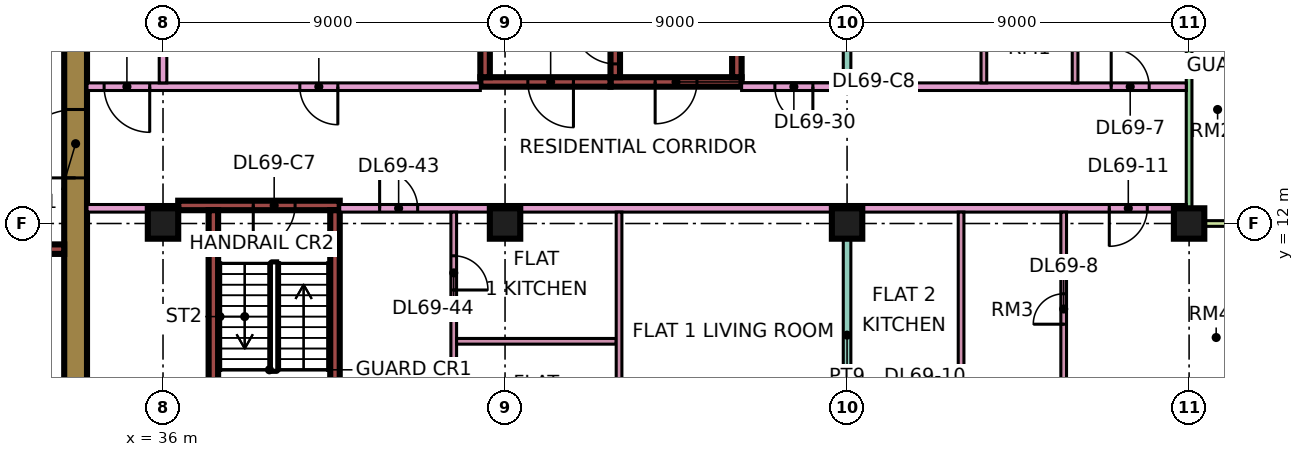
"""IFC4 building model, lengths in metres.
Left out: names, types, materials, properties, quantities, classifications, styles, units other than length and angle.
Written with IfcOpenShell. Run it as: python <this file> out.ifc"""

import sys

from ifc_helpers import new_model, si_unit, direction, frame, frame_2d, origin, origin_2d, place, context, subcontext, project, spatial, rectangle, extrude, element, fill, save


model = new_model("IFC4")
c1 = context("Model", 3, precision=1e-05, world=origin(), true_north=direction((0.0, 1.0)))
c2 = subcontext(c1, "Body", "Model", "MODEL_VIEW")
j1 = project(units=[si_unit("LENGTHUNIT", "METRE"), si_unit("PLANEANGLEUNIT", "RADIAN")], contexts=[c1])
p1 = place(None, origin())
s1 = spatial("IfcSite", under=j1, at=p1, CompositionType="ELEMENT")
p2 = place(p1, origin())
s2 = spatial("IfcBuilding", under=s1, at=p2, CompositionType="ELEMENT")
p3 = place(p2, frame((0.0, 0.0, 295.9)))
s3 = spatial("IfcBuildingStorey", under=s2, at=p3, CompositionType="ELEMENT", Elevation=295.9)
for number, where, z_axis, x_axis in (
    (1, (36.0, 12.0, 0.0), (0.0, 0.0, 1.0), (1.0, 0.0, 0.0)),
    (2, (45.0, 12.0, 0.0), (0.0, 0.0, 1.0), (1.0, 0.0, 0.0)),
    (3, (54.0, 12.0, 0.0), (0.0, 0.0, 1.0), (1.0, 0.0, 0.0)),
    (4, (63.0, 12.0, 0.0), (0.0, 0.0, 1.0), (1.0, 0.0, 0.0)),
):
    element("IfcColumn", number, at=place(p3, frame(where, z_axis=z_axis, x_axis=x_axis)), inside=s3, PredefinedType="COLUMN", context=c2, shape_type="SweptSolid", body=[
        extrude(rectangle(XDim=0.8, YDim=0.8, at=origin_2d()), origin(), (0.0, 0.0, 1.0), 3.75),
    ])
p4 = place(p3, frame((33.7, 7.6, 0.0), z_axis=(0.0, 0.0, 1.0), x_axis=(0.0, 1.0, 0.0)))
e5 = element("IfcWall", 5, at=p4, inside=s3, PredefinedType="SHEAR", context=c2, shape_type="SweptSolid", body=[
    extrude(rectangle(XDim=11.8, YDim=0.6, at=frame_2d((5.9, 0.0))), origin(), (0.0, 0.0, 1.0), 3.75),
])
p5 = place(p4, frame((5.6, 0.0, 0.0)))
e6 = element("IfcOpeningElement", 6, at=p5, cuts=e5, PredefinedType="OPENING", context=c2, shape_type="SweptSolid", body=[
    extrude(rectangle(XDim=1.8, YDim=2.4, at=frame_2d((0.9, 1.2))), frame((0.0, 0.31, 0.0), z_axis=(0.0, -1.0, 0.0), x_axis=(1.0, 0.0, 0.0)), (0.0, 0.0, 1.0), 0.62),
])
p6 = place(p3, frame((13.45, 11.325, 0.0), z_axis=(0.0, 0.0, 1.0), x_axis=(1.0, 0.0, 0.0)))
e7 = element("IfcWall", 7, at=p6, inside=s3, PredefinedType="SHEAR", context=c2, shape_type="SweptSolid", body=[
    extrude(rectangle(XDim=19.95, YDim=0.25, at=frame_2d((9.975, 0.0))), origin(), (0.0, 0.0, 1.0), 3.75),
])
p7 = place(p6, frame((4.925, 0.0, 0.0)))
e8 = element("IfcOpeningElement", 8, at=p7, cuts=e7, PredefinedType="OPENING", context=c2, shape_type="SweptSolid", body=[
    extrude(rectangle(XDim=0.9, YDim=2.1, at=frame_2d((0.45, 1.05))), frame((0.0, 0.135, 0.0), z_axis=(0.0, -1.0, 0.0), x_axis=(1.0, 0.0, 0.0)), (0.0, 0.0, 1.0), 0.27),
])
p8 = place(p6, frame((12.3, 0.0, 0.0)))
e9 = element("IfcOpeningElement", 9, at=p8, cuts=e7, PredefinedType="OPENING", context=c2, shape_type="SweptSolid", body=[
    extrude(rectangle(XDim=0.9, YDim=2.1, at=frame_2d((0.45, 1.05))), frame((0.0, 0.135, 0.0), z_axis=(0.0, -1.0, 0.0), x_axis=(1.0, 0.0, 0.0)), (0.0, 0.0, 1.0), 0.27),
])
p9 = place(p6, frame((16.775, 0.0, 0.0)))
e10 = element("IfcOpeningElement", 10, at=p9, cuts=e7, PredefinedType="OPENING", context=c2, shape_type="SweptSolid", body=[
    extrude(rectangle(XDim=0.9, YDim=2.1, at=frame_2d((0.45, 1.05))), frame((0.0, 0.135, 0.0), z_axis=(0.0, -1.0, 0.0), x_axis=(1.0, 0.0, 0.0)), (0.0, 0.0, 1.0), 0.27),
])
p10 = place(p3, frame((36.4, 12.475, 0.0), z_axis=(0.0, 0.0, 1.0), x_axis=(1.0, 0.0, 0.0)))
e11 = element("IfcWall", 11, at=p10, inside=s3, PredefinedType="SHEAR", context=c2, shape_type="SweptSolid", body=[
    extrude(rectangle(XDim=4.25, YDim=0.25, at=frame_2d((2.125, 0.0))), origin(), (0.0, 0.0, 1.0), 3.75),
])
p11 = place(p10, frame((1.975, 0.0, 0.0)))
e12 = element("IfcOpeningElement", 12, at=p11, cuts=e11, PredefinedType="OPENING", context=c2, shape_type="SweptSolid", body=[
    extrude(rectangle(XDim=1.1, YDim=2.2, at=frame_2d((0.55, 1.1))), frame((0.0, 0.135, 0.0), z_axis=(0.0, -1.0, 0.0), x_axis=(1.0, 0.0, 0.0)), (0.0, 0.0, 1.0), 0.27),
])
for number, where, z_axis, x_axis in (
    (13, (37.325, 5.85, 0.0), (0.0, 0.0, 1.0), (0.0, 1.0, 0.0)),
    (14, (40.525, 5.85, 0.0), (0.0, 0.0, 1.0), (0.0, 1.0, 0.0)),
):
    element("IfcWall", number, at=place(p3, frame(where, z_axis=z_axis, x_axis=x_axis)), inside=s3, PredefinedType="SHEAR", context=c2, shape_type="SweptSolid", body=[
        extrude(rectangle(XDim=6.5, YDim=0.25, at=frame_2d((3.25, 0.0))), origin(), (0.0, 0.0, 1.0), 3.75),
    ])
p12 = place(p3, frame((47.775, 15.725, 0.0), z_axis=(0.0, 0.0, 1.0), x_axis=(1.0, 0.0, 0.0)))
e15 = element("IfcWall", 15, at=p12, inside=s3, PredefinedType="SHEAR", context=c2, shape_type="SweptSolid", body=[
    extrude(rectangle(XDim=3.45, YDim=0.25, at=frame_2d((1.725, 0.0))), origin(), (0.0, 0.0, 1.0), 3.75),
])
p13 = place(p12, frame((1.175, 0.0, 0.0)))
e16 = element("IfcOpeningElement", 16, at=p13, cuts=e15, PredefinedType="OPENING", context=c2, shape_type="SweptSolid", body=[
    extrude(rectangle(XDim=1.1, YDim=2.2, at=frame_2d((0.55, 1.1))), frame((0.0, 0.135, 0.0), z_axis=(0.0, -1.0, 0.0), x_axis=(1.0, 0.0, 0.0)), (0.0, 0.0, 1.0), 0.27),
])
p14 = place(p3, frame((47.9, 15.85, 0.0), z_axis=(0.0, 0.0, 1.0), x_axis=(0.0, 1.0, 0.0)))
e17 = element("IfcWall", 17, at=p14, inside=s3, PredefinedType="SHEAR", context=c2, shape_type="SweptSolid", body=[
    extrude(rectangle(XDim=6.5, YDim=0.25, at=frame_2d((3.25, 0.0))), origin(), (0.0, 0.0, 1.0), 3.75),
])
p15 = place(p14, frame((0.35, 0.0, 0.0)))
e18 = element("IfcOpeningElement", 18, at=p15, cuts=e17, PredefinedType="OPENING", context=c2, shape_type="SweptSolid", body=[
    extrude(rectangle(XDim=1.1, YDim=2.2, at=frame_2d((0.55, 1.1))), frame((0.0, 0.135, 0.0), z_axis=(0.0, -1.0, 0.0), x_axis=(1.0, 0.0, 0.0)), (0.0, 0.0, 1.0), 0.27),
])
p16 = place(p3, frame((51.1, 15.85, 0.0), z_axis=(0.0, 0.0, 1.0), x_axis=(0.0, 1.0, 0.0)))
e19 = element("IfcWall", 19, at=p16, inside=s3, PredefinedType="SHEAR", context=c2, shape_type="SweptSolid", body=[
    extrude(rectangle(XDim=6.5, YDim=0.25, at=frame_2d((3.25, 0.0))), origin(), (0.0, 0.0, 1.0), 3.75),
])
p17 = place(p3, frame((44.35, 15.725, 0.0), z_axis=(0.0, 0.0, 1.0), x_axis=(1.0, 0.0, 0.0)))
e20 = element("IfcWall", 20, at=p17, inside=s3, PredefinedType="SHEAR", context=c2, shape_type="SweptSolid", body=[
    extrude(rectangle(XDim=3.425, YDim=0.25, at=frame_2d((1.712, 0.0))), origin(), (0.0, 0.0, 1.0), 3.75),
])
p18 = place(p17, frame((1.25, 0.0, 0.0)))
e21 = element("IfcOpeningElement", 21, at=p18, cuts=e20, PredefinedType="OPENING", context=c2, shape_type="SweptSolid", body=[
    extrude(rectangle(XDim=1.2, YDim=2.2, at=frame_2d((0.6, 1.1))), frame((0.0, 0.135, 0.0), z_axis=(0.0, -1.0, 0.0), x_axis=(1.0, 0.0, 0.0)), (0.0, 0.0, 1.0), 0.27),
])
p19 = place(p3, frame((44.475, 15.85, 0.0), z_axis=(0.0, 0.0, 1.0), x_axis=(0.0, 1.0, 0.0)))
e22 = element("IfcWall", 22, at=p19, inside=s3, PredefinedType="SHEAR", context=c2, shape_type="SweptSolid", body=[
    extrude(rectangle(XDim=6.5, YDim=0.25, at=frame_2d((3.25, 0.0))), origin(), (0.0, 0.0, 1.0), 3.75),
])
p20 = place(p19, frame((1.75, 0.0, 0.0)))
e23 = element("IfcOpeningElement", 23, at=p20, cuts=e22, PredefinedType="OPENING", context=c2, shape_type="SweptSolid", body=[
    extrude(rectangle(XDim=1.1, YDim=2.2, at=frame_2d((0.55, 1.1))), frame((0.0, 0.135, 0.0), z_axis=(0.0, -1.0, 0.0), x_axis=(1.0, 0.0, 0.0)), (0.0, 0.0, 1.0), 0.27),
])
p21 = place(p19, frame((4.3, 0.0, 0.0)))
e24 = element("IfcOpeningElement", 24, at=p21, cuts=e22, PredefinedType="OPENING", context=c2, shape_type="SweptSolid", body=[
    extrude(rectangle(XDim=1.1, YDim=2.2, at=frame_2d((0.55, 1.1))), frame((0.0, 0.135, 0.0), z_axis=(0.0, -1.0, 0.0), x_axis=(1.0, 0.0, 0.0)), (0.0, 0.0, 1.0), 0.27),
])
p22 = place(p3, frame((63.0, 12.075, 0.0), z_axis=(0.0, 0.0, 1.0), x_axis=(0.0, 1.0, 0.0)))
e25 = element("IfcWall", 25, at=p22, inside=s3, PredefinedType="SOLIDWALL", context=c2, shape_type="SweptSolid", body=[
    extrude(rectangle(XDim=10.35, YDim=0.15, at=frame_2d((5.175, 0.0))), origin(), (0.0, 0.0, 1.0), 3.35),
])
p23 = place(p22, frame((6.038, 0.0, 0.0)))
e26 = element("IfcOpeningElement", 26, at=p23, cuts=e25, PredefinedType="OPENING", context=c2, shape_type="SweptSolid", body=[
    extrude(rectangle(XDim=1.8, YDim=2.4, at=frame_2d((0.9, 1.2))), frame((0.0, 0.085, 0.0), z_axis=(0.0, -1.0, 0.0), x_axis=(1.0, 0.0, 0.0)), (0.0, 0.0, 1.0), 0.17),
])
p24 = place(p3, frame((64.5, 12.0, 0.0), z_axis=(0.0, 0.0, 1.0), x_axis=(-1.0, 0.0, 0.0)))
e27 = element("IfcWall", 27, at=p24, inside=s3, PredefinedType="SOLIDWALL", context=c2, shape_type="SweptSolid", body=[
    extrude(rectangle(XDim=1.5, YDim=0.15, at=frame_2d((0.75, 0.0))), origin(), (0.0, 0.0, 1.0), 3.35),
])
p25 = place(p3, frame((34.0, 12.4, 0.0), z_axis=(0.0, 0.0, 1.0), x_axis=(1.0, 0.0, 0.0)))
e28 = element("IfcWall", 28, at=p25, inside=s3, PredefinedType="PARTITIONING", context=c2, shape_type="SweptSolid", body=[
    extrude(rectangle(XDim=2.401, YDim=0.2, at=frame_2d((1.2, 0.0))), origin(), (0.0, 0.0, 1.0), 3.35),
])
p26 = place(p3, frame((34.0, 15.6, 0.0), z_axis=(0.0, 0.0, 1.0), x_axis=(1.0, 0.0, 0.0)))
e29 = element("IfcWall", 29, at=p26, inside=s3, PredefinedType="PARTITIONING", context=c2, shape_type="SweptSolid", body=[
    extrude(rectangle(XDim=10.35, YDim=0.2, at=frame_2d((5.175, 0.0))), origin(), (0.0, 0.0, 1.0), 3.35),
])
p27 = place(p26, frame((5.6, 0.0, 0.0)))
e30 = element("IfcOpeningElement", 30, at=p27, cuts=e29, PredefinedType="OPENING", context=c2, shape_type="SweptSolid", body=[
    extrude(rectangle(XDim=1.0, YDim=2.1, at=frame_2d((0.5, 1.05))), frame((0.0, 0.11, 0.0), z_axis=(0.0, -1.0, 0.0), x_axis=(1.0, 0.0, 0.0)), (0.0, 0.0, 1.0), 0.22),
])
p28 = place(p26, frame((0.45, 0.0, 0.0)))
e31 = element("IfcOpeningElement", 31, at=p28, cuts=e29, PredefinedType="OPENING", context=c2, shape_type="SweptSolid", body=[
    extrude(rectangle(XDim=1.2, YDim=2.1, at=frame_2d((0.6, 1.05))), frame((0.0, 0.11, 0.0), z_axis=(0.0, -1.0, 0.0), x_axis=(1.0, 0.0, 0.0)), (0.0, 0.0, 1.0), 0.22),
])
p29 = place(p3, frame((36.0, 15.7, 0.0), z_axis=(0.0, 0.0, 1.0), x_axis=(0.0, 1.0, 0.0)))
e32 = element("IfcWall", 32, at=p29, inside=s3, PredefinedType="PARTITIONING", context=c2, shape_type="SweptSolid", body=[
    extrude(rectangle(XDim=8.3, YDim=0.2, at=frame_2d((4.15, 0.0))), origin(), (0.0, 0.0, 1.0), 3.35),
])
p30 = place(p3, frame((40.65, 12.4, 0.0), z_axis=(0.0, 0.0, 1.0), x_axis=(1.0, 0.0, 0.0)))
e33 = element("IfcWall", 33, at=p30, inside=s3, PredefinedType="PARTITIONING", context=c2, shape_type="SweptSolid", body=[
    extrude(rectangle(XDim=22.276, YDim=0.2, at=frame_2d((11.138, 0.0))), origin(), (0.0, 0.0, 1.0), 3.35),
])
p31 = place(p30, frame((20.25, 0.0, 0.0)))
e34 = element("IfcOpeningElement", 34, at=p31, cuts=e33, PredefinedType="OPENING", context=c2, shape_type="SweptSolid", body=[
    extrude(rectangle(XDim=1.0, YDim=2.1, at=frame_2d((0.5, 1.05))), frame((0.0, 0.11, 0.0), z_axis=(0.0, -1.0, 0.0), x_axis=(1.0, 0.0, 0.0)), (0.0, 0.0, 1.0), 0.22),
])
p32 = place(p30, frame((1.05, 0.0, 0.0)))
e35 = element("IfcOpeningElement", 35, at=p32, cuts=e33, PredefinedType="OPENING", context=c2, shape_type="SweptSolid", body=[
    extrude(rectangle(XDim=1.0, YDim=2.1, at=frame_2d((0.5, 1.05))), frame((0.0, 0.11, 0.0), z_axis=(0.0, -1.0, 0.0), x_axis=(1.0, 0.0, 0.0)), (0.0, 0.0, 1.0), 0.22),
])
p33 = place(p3, frame((43.65, 5.975, 0.0), z_axis=(0.0, 0.0, 1.0), x_axis=(0.0, 1.0, 0.0)))
e36 = element("IfcWall", 36, at=p33, inside=s3, PredefinedType="PARTITIONING", context=c2, shape_type="SweptSolid", body=[
    extrude(rectangle(XDim=6.325, YDim=0.15, at=frame_2d((3.163, 0.0))), origin(), (0.0, 0.0, 1.0), 3.35),
])
p34 = place(p33, frame((4.275, 0.0, 0.0)))
e37 = element("IfcOpeningElement", 37, at=p34, cuts=e36, PredefinedType="OPENING", context=c2, shape_type="SweptSolid", body=[
    extrude(rectangle(XDim=0.9, YDim=2.1, at=frame_2d((0.45, 1.05))), frame((0.0, 0.085, 0.0), z_axis=(0.0, -1.0, 0.0), x_axis=(1.0, 0.0, 0.0)), (0.0, 0.0, 1.0), 0.17),
])
p35 = place(p3, frame((43.725, 8.9, 0.0), z_axis=(0.0, 0.0, 1.0), x_axis=(1.0, 0.0, 0.0)))
e38 = element("IfcWall", 38, at=p35, inside=s3, PredefinedType="PARTITIONING", context=c2, shape_type="SweptSolid", body=[
    extrude(rectangle(XDim=4.2, YDim=0.15, at=frame_2d((2.1, 0.0))), origin(), (0.0, 0.0, 1.0), 3.35),
])
p36 = place(p3, frame((48.0, 5.975, 0.0), z_axis=(0.0, 0.0, 1.0), x_axis=(0.0, 1.0, 0.0)))
e39 = element("IfcWall", 39, at=p36, inside=s3, PredefinedType="PARTITIONING", context=c2, shape_type="SweptSolid", body=[
    extrude(rectangle(XDim=6.325, YDim=0.15, at=frame_2d((3.163, 0.0))), origin(), (0.0, 0.0, 1.0), 3.35),
])
p37 = place(p3, frame((51.225, 15.6, 0.0), z_axis=(0.0, 0.0, 1.0), x_axis=(1.0, 0.0, 0.0)))
e40 = element("IfcWall", 40, at=p37, inside=s3, PredefinedType="PARTITIONING", context=c2, shape_type="SweptSolid", body=[
    extrude(rectangle(XDim=11.701, YDim=0.2, at=frame_2d((5.851, 0.0))), origin(), (0.0, 0.0, 1.0), 3.35),
])
p38 = place(p37, frame((9.725, 0.0, 0.0)))
e41 = element("IfcOpeningElement", 41, at=p38, cuts=e40, PredefinedType="OPENING", context=c2, shape_type="SweptSolid", body=[
    extrude(rectangle(XDim=1.0, YDim=2.1, at=frame_2d((0.5, 1.05))), frame((0.0, 0.11, 0.0), z_axis=(0.0, -1.0, 0.0), x_axis=(1.0, 0.0, 0.0)), (0.0, 0.0, 1.0), 0.22),
])
p39 = place(p37, frame((0.875, 0.0, 0.0)))
e42 = element("IfcOpeningElement", 42, at=p39, cuts=e40, PredefinedType="OPENING", context=c2, shape_type="SweptSolid", body=[
    extrude(rectangle(XDim=1.0, YDim=2.1, at=frame_2d((0.5, 1.05))), frame((0.0, 0.11, 0.0), z_axis=(0.0, -1.0, 0.0), x_axis=(1.0, 0.0, 0.0)), (0.0, 0.0, 1.0), 0.22),
])
p40 = place(p3, frame((54.0, 5.825, 0.0), z_axis=(0.0, 0.0, 1.0), x_axis=(0.0, 1.0, 0.0)))
e43 = element("IfcWall", 43, at=p40, inside=s3, PredefinedType="PARTITIONING", context=c2, shape_type="SweptSolid", body=[
    extrude(rectangle(XDim=6.475, YDim=0.2, at=frame_2d((3.238, 0.0))), origin(), (0.0, 0.0, 1.0), 3.35),
])
p41 = place(p3, frame((54.0, 15.7, 0.0), z_axis=(0.0, 0.0, 1.0), x_axis=(0.0, 1.0, 0.0)))
e44 = element("IfcWall", 44, at=p41, inside=s3, PredefinedType="PARTITIONING", context=c2, shape_type="SweptSolid", body=[
    extrude(rectangle(XDim=8.3, YDim=0.2, at=frame_2d((4.15, 0.0))), origin(), (0.0, 0.0, 1.0), 3.35),
])
p42 = place(p3, frame((57.0, 7.075, 0.0), z_axis=(0.0, 0.0, 1.0), x_axis=(0.0, 1.0, 0.0)))
e45 = element("IfcWall", 45, at=p42, inside=s3, PredefinedType="PARTITIONING", context=c2, shape_type="SweptSolid", body=[
    extrude(rectangle(XDim=5.225, YDim=0.15, at=frame_2d((2.613, 0.0))), origin(), (0.0, 0.0, 1.0), 3.35),
])
p43 = place(p3, frame((57.6, 15.7, 0.0), z_axis=(0.0, 0.0, 1.0), x_axis=(0.0, 1.0, 0.0)))
e46 = element("IfcWall", 46, at=p43, inside=s3, PredefinedType="PARTITIONING", context=c2, shape_type="SweptSolid", body=[
    extrude(rectangle(XDim=2.825, YDim=0.15, at=frame_2d((1.413, 0.0))), origin(), (0.0, 0.0, 1.0), 3.35),
])
p44 = place(p3, frame((59.7, 7.075, 0.0), z_axis=(0.0, 0.0, 1.0), x_axis=(0.0, 1.0, 0.0)))
e47 = element("IfcWall", 47, at=p44, inside=s3, PredefinedType="PARTITIONING", context=c2, shape_type="SweptSolid", body=[
    extrude(rectangle(XDim=5.225, YDim=0.15, at=frame_2d((2.613, 0.0))), origin(), (0.0, 0.0, 1.0), 3.35),
])
p45 = place(p44, frame((2.275, 0.0, 0.0)))
e48 = element("IfcOpeningElement", 48, at=p45, cuts=e47, PredefinedType="OPENING", context=c2, shape_type="SweptSolid", body=[
    extrude(rectangle(XDim=0.8, YDim=2.1, at=frame_2d((0.4, 1.05))), frame((0.0, 0.085, 0.0), z_axis=(0.0, -1.0, 0.0), x_axis=(1.0, 0.0, 0.0)), (0.0, 0.0, 1.0), 0.17),
])
p46 = place(p3, frame((60.0, 15.7, 0.0), z_axis=(0.0, 0.0, 1.0), x_axis=(0.0, 1.0, 0.0)))
e49 = element("IfcWall", 49, at=p46, inside=s3, PredefinedType="PARTITIONING", context=c2, shape_type="SweptSolid", body=[
    extrude(rectangle(XDim=2.825, YDim=0.15, at=frame_2d((1.413, 0.0))), origin(), (0.0, 0.0, 1.0), 3.35),
])
p47 = place(p5, origin())
e50 = element("IfcDoor", 50, at=p47, inside=s3, OperationType="DOUBLE_DOOR_SINGLE_SWING", PredefinedType="DOOR", context=c2, shape_type="SweptSolid", body=[
    extrude(rectangle(XDim=1.8, YDim=2.4, at=frame_2d((0.9, 1.2))), frame((0.0, 0.025, 0.0), z_axis=(0.0, -1.0, 0.0), x_axis=(1.0, 0.0, 0.0)), (0.0, 0.0, 1.0), 0.05),
])
fill(e6, e50)
p48 = place(p11, frame((1.1, 0.0, 0.0), z_axis=(0.0, 0.0, 1.0), x_axis=(-1.0, 0.0, 0.0)))
e51 = element("IfcDoor", 51, at=p48, inside=s3, OperationType="SINGLE_SWING_LEFT", PredefinedType="DOOR", context=c2, shape_type="SweptSolid", body=[
    extrude(rectangle(XDim=1.1, YDim=2.2, at=frame_2d((0.55, 1.1))), frame((0.0, 0.025, 0.0), z_axis=(0.0, -1.0, 0.0), x_axis=(1.0, 0.0, 0.0)), (0.0, 0.0, 1.0), 0.05),
])
fill(e12, e51)
p49 = place(p13, frame((1.1, 0.0, 0.0), z_axis=(0.0, 0.0, 1.0), x_axis=(-1.0, 0.0, 0.0)))
e52 = element("IfcDoor", 52, at=p49, inside=s3, OperationType="SINGLE_SWING_LEFT", PredefinedType="DOOR", context=c2, shape_type="SweptSolid", body=[
    extrude(rectangle(XDim=1.1, YDim=2.2, at=frame_2d((0.55, 1.1))), frame((0.0, 0.025, 0.0), z_axis=(0.0, -1.0, 0.0), x_axis=(1.0, 0.0, 0.0)), (0.0, 0.0, 1.0), 0.05),
])
fill(e16, e52)
p50 = place(p18, origin())
e53 = element("IfcDoor", 53, at=p50, inside=s3, OperationType="SINGLE_SWING_RIGHT", PredefinedType="DOOR", context=c2, shape_type="SweptSolid", body=[
    extrude(rectangle(XDim=1.2, YDim=2.2, at=frame_2d((0.6, 1.1))), frame((0.0, 0.025, 0.0), z_axis=(0.0, -1.0, 0.0), x_axis=(1.0, 0.0, 0.0)), (0.0, 0.0, 1.0), 0.05),
])
fill(e21, e53)
p51 = place(p15, frame((1.1, 0.0, 0.0), z_axis=(0.0, 0.0, 1.0), x_axis=(-1.0, 0.0, 0.0)))
e54 = element("IfcDoor", 54, at=p51, inside=s3, OperationType="SINGLE_SWING_RIGHT", PredefinedType="DOOR", context=c2, shape_type="SweptSolid", body=[
    extrude(rectangle(XDim=1.1, YDim=2.2, at=frame_2d((0.55, 1.1))), frame((0.0, 0.025, 0.0), z_axis=(0.0, -1.0, 0.0), x_axis=(1.0, 0.0, 0.0)), (0.0, 0.0, 1.0), 0.05),
])
fill(e18, e54)
p52 = place(p27, origin())
e55 = element("IfcDoor", 55, at=p52, inside=s3, OperationType="SINGLE_SWING_RIGHT", PredefinedType="DOOR", context=c2, shape_type="SweptSolid", body=[
    extrude(rectangle(XDim=1.0, YDim=2.1, at=frame_2d((0.5, 1.05))), frame((0.0, 0.025, 0.0), z_axis=(0.0, -1.0, 0.0), x_axis=(1.0, 0.0, 0.0)), (0.0, 0.0, 1.0), 0.05),
])
fill(e30, e55)
p53 = place(p38, origin())
e56 = element("IfcDoor", 56, at=p53, inside=s3, OperationType="SINGLE_SWING_LEFT", PredefinedType="DOOR", context=c2, shape_type="SweptSolid", body=[
    extrude(rectangle(XDim=1.0, YDim=2.1, at=frame_2d((0.5, 1.05))), frame((0.0, 0.025, 0.0), z_axis=(0.0, -1.0, 0.0), x_axis=(1.0, 0.0, 0.0)), (0.0, 0.0, 1.0), 0.05),
])
fill(e41, e56)
p54 = place(p45, origin())
e57 = element("IfcDoor", 57, at=p54, inside=s3, OperationType="SINGLE_SWING_LEFT", PredefinedType="DOOR", context=c2, shape_type="SweptSolid", body=[
    extrude(rectangle(XDim=0.8, YDim=2.1, at=frame_2d((0.4, 1.05))), frame((0.0, 0.025, 0.0), z_axis=(0.0, -1.0, 0.0), x_axis=(1.0, 0.0, 0.0)), (0.0, 0.0, 1.0), 0.05),
])
fill(e48, e57)
p55 = place(p31, frame((1.0, 0.0, 0.0), z_axis=(0.0, 0.0, 1.0), x_axis=(-1.0, 0.0, 0.0)))
e58 = element("IfcDoor", 58, at=p55, inside=s3, OperationType="SINGLE_SWING_LEFT", PredefinedType="DOOR", context=c2, shape_type="SweptSolid", body=[
    extrude(rectangle(XDim=1.0, YDim=2.1, at=frame_2d((0.5, 1.05))), frame((0.0, 0.025, 0.0), z_axis=(0.0, -1.0, 0.0), x_axis=(1.0, 0.0, 0.0)), (0.0, 0.0, 1.0), 0.05),
])
fill(e34, e58)
p56 = place(p28, origin())
e59 = element("IfcDoor", 59, at=p56, inside=s3, OperationType="SINGLE_SWING_RIGHT", PredefinedType="DOOR", context=c2, shape_type="SweptSolid", body=[
    extrude(rectangle(XDim=1.2, YDim=2.1, at=frame_2d((0.6, 1.05))), frame((0.0, 0.025, 0.0), z_axis=(0.0, -1.0, 0.0), x_axis=(1.0, 0.0, 0.0)), (0.0, 0.0, 1.0), 0.05),
])
fill(e31, e59)
p57 = place(p39, origin())
e60 = element("IfcDoor", 60, at=p57, inside=s3, OperationType="SINGLE_SWING_RIGHT", PredefinedType="DOOR", context=c2, shape_type="SweptSolid", body=[
    extrude(rectangle(XDim=1.0, YDim=2.1, at=frame_2d((0.5, 1.05))), frame((0.0, 0.025, 0.0), z_axis=(0.0, -1.0, 0.0), x_axis=(1.0, 0.0, 0.0)), (0.0, 0.0, 1.0), 0.05),
])
fill(e42, e60)
p58 = place(p32, origin())
e61 = element("IfcDoor", 61, at=p58, inside=s3, OperationType="SINGLE_SWING_LEFT", PredefinedType="DOOR", context=c2, shape_type="SweptSolid", body=[
    extrude(rectangle(XDim=1.0, YDim=2.1, at=frame_2d((0.5, 1.05))), frame((0.0, 0.025, 0.0), z_axis=(0.0, -1.0, 0.0), x_axis=(1.0, 0.0, 0.0)), (0.0, 0.0, 1.0), 0.05),
])
fill(e35, e61)
p59 = place(p34, frame((0.9, 0.0, 0.0), z_axis=(0.0, 0.0, 1.0), x_axis=(-1.0, 0.0, 0.0)))
e62 = element("IfcDoor", 62, at=p59, inside=s3, OperationType="SINGLE_SWING_LEFT", PredefinedType="DOOR", context=c2, shape_type="SweptSolid", body=[
    extrude(rectangle(XDim=0.9, YDim=2.1, at=frame_2d((0.45, 1.05))), frame((0.0, 0.025, 0.0), z_axis=(0.0, -1.0, 0.0), x_axis=(1.0, 0.0, 0.0)), (0.0, 0.0, 1.0), 0.05),
])
fill(e37, e62)
save(model, sys.argv[1])
